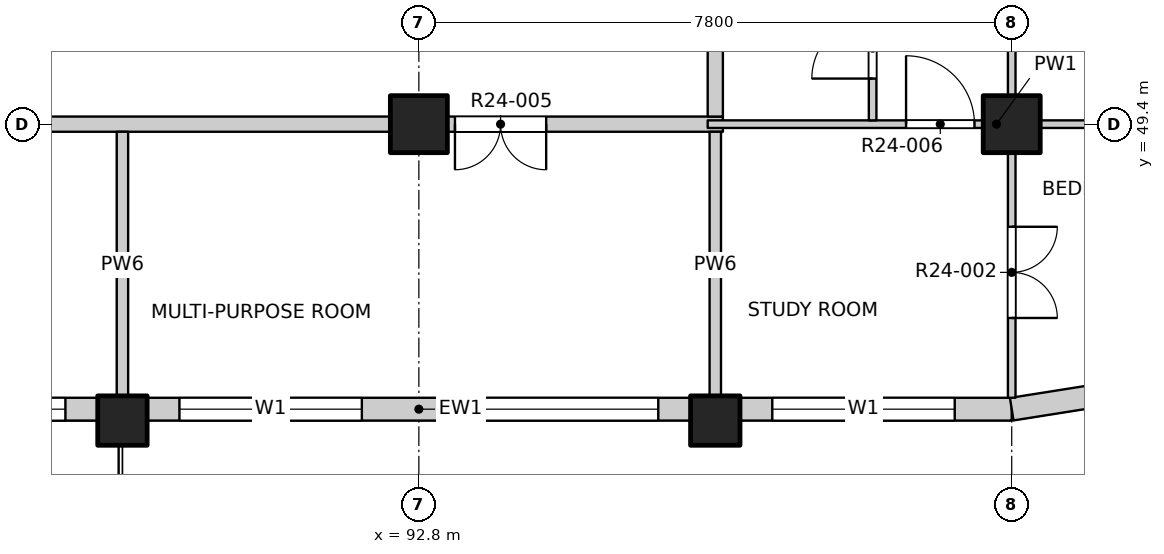
"""IFC4 building model, lengths in metres.
Left out: names, types, materials, properties, quantities, classifications, styles, units other than length and angle.
Written with IfcOpenShell. Run it as: python <this file> out.ifc"""

import sys

from ifc_helpers import new_model, si_unit, direction, frame, frame_2d, origin, origin_2d, place, context, subcontext, project, spatial, rectangle, extrude, element, fill, save


model = new_model("IFC4")
c1 = context("Model", 3, precision=1e-05, world=origin(), true_north=direction((0.0, 1.0)))
c2 = subcontext(c1, "Body", "Model", "MODEL_VIEW")
j1 = project(units=[si_unit("LENGTHUNIT", "METRE"), si_unit("PLANEANGLEUNIT", "RADIAN")], contexts=[c1])
p1 = place(None, origin())
s1 = spatial("IfcSite", under=j1, at=p1, CompositionType="ELEMENT")
p2 = place(p1, origin())
s2 = spatial("IfcBuilding", under=s1, at=p2, CompositionType="ELEMENT")
p3 = place(p2, frame((0.0, 0.0, 246.0)))
s3 = spatial("IfcBuildingStorey", under=s2, at=p3, CompositionType="ELEMENT", Elevation=246.0)
for number, where, z_axis, x_axis in (
    (1, (88.9, 45.5, -0.3), (0.0, 0.0, 1.0), (1.0, 0.0, 0.0)),
    (2, (96.7, 45.5, -0.3), (0.0, 0.0, 1.0), (1.0, 0.0, 0.0)),
):
    element("IfcColumn", number, at=place(p3, frame(where, z_axis=z_axis, x_axis=x_axis)), inside=s3, PredefinedType="COLUMN", context=c2, shape_type="SweptSolid", body=[
        extrude(rectangle(XDim=0.65, YDim=0.65, at=origin_2d()), origin(), (0.0, 0.0, 1.0), 3.45),
    ])
for number, where, z_axis, x_axis in (
    (3, (92.8, 49.4, -0.3), (0.0, 0.0, 1.0), (1.0, 0.0, 0.0)),
    (4, (100.6, 49.4, -0.3), (0.0, 0.0, 1.0), (1.0, 0.0, 0.0)),
):
    element("IfcColumn", number, at=place(p3, frame(where, z_axis=z_axis, x_axis=x_axis)), inside=s3, PredefinedType="COLUMN", context=c2, shape_type="SweptSolid", body=[
        extrude(rectangle(XDim=0.75, YDim=0.75, at=origin_2d()), origin(), (0.0, 0.0, 1.0), 3.45),
    ])
p4 = place(p3, frame((81.425, 45.65, 0.0), z_axis=(0.0, 0.0, 1.0), x_axis=(1.0, 0.0, 0.0)))
e5 = element("IfcWall", 5, at=p4, inside=s3, PredefinedType="SOLIDWALL", context=c2, shape_type="SweptSolid", body=[
    extrude(rectangle(XDim=7.15, YDim=0.3, at=frame_2d((3.575, 0.0))), origin(), (0.0, 0.0, 1.0), 2.7),
])
p5 = place(p4, frame((0.725, 0.0, 0.0)))
e6 = element("IfcOpeningElement", 6, at=p5, cuts=e5, PredefinedType="OPENING", context=c2, shape_type="SweptSolid", body=[
    extrude(rectangle(XDim=1.8, YDim=2.4, at=frame_2d((0.9, 1.2))), frame((0.0, 0.16, 0.0), z_axis=(0.0, -1.0, 0.0), x_axis=(1.0, 0.0, 0.0)), (0.0, 0.0, 1.0), 0.32),
])
p6 = place(p4, frame((4.325, 0.0, 0.9)))
e7 = element("IfcOpeningElement", 7, at=p6, cuts=e5, PredefinedType="OPENING", context=c2, shape_type="SweptSolid", body=[
    extrude(rectangle(XDim=2.4, YDim=1.8, at=frame_2d((1.2, 0.9))), frame((0.0, 0.16, 0.0), z_axis=(0.0, -1.0, 0.0), x_axis=(1.0, 0.0, 0.0)), (0.0, 0.0, 1.0), 0.32),
])
p7 = place(p3, frame((89.225, 45.65, 0.0), z_axis=(0.0, 0.0, 1.0), x_axis=(1.0, 0.0, 0.0)))
e8 = element("IfcWall", 8, at=p7, inside=s3, PredefinedType="SOLIDWALL", context=c2, shape_type="SweptSolid", body=[
    extrude(rectangle(XDim=7.15, YDim=0.3, at=frame_2d((3.575, 0.0))), origin(), (0.0, 0.0, 1.0), 2.7),
])
p8 = place(p7, frame((0.425, 0.0, 0.9)))
e9 = element("IfcOpeningElement", 9, at=p8, cuts=e8, PredefinedType="OPENING", context=c2, shape_type="SweptSolid", body=[
    extrude(rectangle(XDim=2.4, YDim=1.8, at=frame_2d((1.2, 0.9))), frame((0.0, 0.16, 0.0), z_axis=(0.0, -1.0, 0.0), x_axis=(1.0, 0.0, 0.0)), (0.0, 0.0, 1.0), 0.32),
])
p9 = place(p7, frame((4.325, 0.0, 0.9)))
e10 = element("IfcOpeningElement", 10, at=p9, cuts=e8, PredefinedType="OPENING", context=c2, shape_type="SweptSolid", body=[
    extrude(rectangle(XDim=2.4, YDim=1.8, at=frame_2d((1.2, 0.9))), frame((0.0, 0.16, 0.0), z_axis=(0.0, -1.0, 0.0), x_axis=(1.0, 0.0, 0.0)), (0.0, 0.0, 1.0), 0.32),
])
p10 = place(p3, frame((97.025, 45.65, 0.0), z_axis=(0.0, 0.0, 1.0), x_axis=(1.0, 0.0, 0.0)))
e11 = element("IfcWall", 11, at=p10, inside=s3, PredefinedType="SOLIDWALL", context=c2, shape_type="SweptSolid", body=[
    extrude(rectangle(XDim=3.575, YDim=0.3, at=frame_2d((1.788, 0.0))), origin(), (0.0, 0.0, 1.0), 2.7),
])
p11 = place(p10, frame((0.425, 0.0, 0.9)))
e12 = element("IfcOpeningElement", 12, at=p11, cuts=e11, PredefinedType="OPENING", context=c2, shape_type="SweptSolid", body=[
    extrude(rectangle(XDim=2.4, YDim=1.8, at=frame_2d((1.2, 0.9))), frame((0.0, 0.16, 0.0), z_axis=(0.0, -1.0, 0.0), x_axis=(1.0, 0.0, 0.0)), (0.0, 0.0, 1.0), 0.32),
])
p12 = place(p3, frame((100.6, 45.65, 0.0), z_axis=(0.0, 0.0, 1.0), x_axis=(0.987678452879, 0.156496880861, 0.0)))
e13 = element("IfcWall", 13, at=p12, inside=s3, PredefinedType="SOLIDWALL", context=c2, shape_type="SweptSolid", body=[
    extrude(rectangle(XDim=1.173, YDim=0.3, at=frame_2d((0.586, 0.0))), origin(), (0.0, 0.0, 1.0), 2.7),
])
p13 = place(p3, frame((73.2, 49.4, 0.0), z_axis=(0.0, 0.0, 1.0), x_axis=(1.0, 0.0, 0.0)))
e14 = element("IfcWall", 14, at=p13, inside=s3, PredefinedType="PARTITIONING", context=c2, shape_type="SweptSolid", body=[
    extrude(rectangle(XDim=23.6, YDim=0.2, at=frame_2d((11.8, 0.0))), origin(), (0.0, 0.0, 1.0), 3.15),
])
p14 = place(p13, frame((7.3, 0.0, 0.0)))
e15 = element("IfcOpeningElement", 15, at=p14, cuts=e14, PredefinedType="OPENING", context=c2, shape_type="SweptSolid", body=[
    extrude(rectangle(XDim=1.2, YDim=2.1, at=frame_2d((0.6, 1.05))), frame((0.0, 0.11, 0.0), z_axis=(0.0, -1.0, 0.0), x_axis=(1.0, 0.0, 0.0)), (0.0, 0.0, 1.0), 0.22),
])
p15 = place(p13, frame((20.075, 0.0, 0.0)))
e16 = element("IfcOpeningElement", 16, at=p15, cuts=e14, PredefinedType="OPENING", context=c2, shape_type="SweptSolid", body=[
    extrude(rectangle(XDim=1.2, YDim=2.1, at=frame_2d((0.6, 1.05))), frame((0.0, 0.11, 0.0), z_axis=(0.0, -1.0, 0.0), x_axis=(1.0, 0.0, 0.0)), (0.0, 0.0, 1.0), 0.22),
])
p16 = place(p3, frame((96.6, 49.4, 0.0), z_axis=(0.0, 0.0, 1.0), x_axis=(1.0, 0.0, 0.0)))
e17 = element("IfcWall", 17, at=p16, inside=s3, PredefinedType="PARTITIONING", context=c2, shape_type="SweptSolid", body=[
    extrude(rectangle(XDim=7.6, YDim=0.1, at=frame_2d((3.8, 0.0))), origin(), (0.0, 0.0, 1.0), 3.15),
])
p17 = place(p16, frame((2.61, 0.0, 0.0)))
e18 = element("IfcOpeningElement", 18, at=p17, cuts=e17, PredefinedType="OPENING", context=c2, shape_type="SweptSolid", body=[
    extrude(rectangle(XDim=0.9, YDim=2.1, at=frame_2d((0.45, 1.05))), frame((0.0, 0.06, 0.0), z_axis=(0.0, -1.0, 0.0), x_axis=(1.0, 0.0, 0.0)), (0.0, 0.0, 1.0), 0.12),
])
p18 = place(p3, frame((88.9, 45.8, 0.0), z_axis=(0.0, 0.0, 1.0), x_axis=(0.0, 1.0, 0.0)))
e19 = element("IfcWall", 19, at=p18, inside=s3, PredefinedType="PARTITIONING", context=c2, shape_type="SweptSolid", body=[
    extrude(rectangle(XDim=3.5, YDim=0.15, at=frame_2d((1.75, 0.0))), origin(), (0.0, 0.0, 1.0), 2.55),
])
p19 = place(p3, frame((96.7, 45.8, 0.0), z_axis=(0.0, 0.0, 1.0), x_axis=(0.0, 1.0, 0.0)))
e20 = element("IfcWall", 20, at=p19, inside=s3, PredefinedType="PARTITIONING", context=c2, shape_type="SweptSolid", body=[
    extrude(rectangle(XDim=3.5, YDim=0.15, at=frame_2d((1.75, 0.0))), origin(), (0.0, 0.0, 1.0), 3.15),
])
p20 = place(p3, frame((96.7, 49.5, 0.0), z_axis=(0.0, 0.0, 1.0), x_axis=(0.0, 1.0, 0.0)))
e21 = element("IfcWall", 21, at=p20, inside=s3, PredefinedType="PARTITIONING", context=c2, shape_type="SweptSolid", body=[
    extrude(rectangle(XDim=34.7, YDim=0.2, at=frame_2d((17.35, 0.0))), origin(), (0.0, 0.0, 1.0), 3.15),
])
p21 = place(p20, frame((3.075, 0.0, 0.0)))
e22 = element("IfcOpeningElement", 22, at=p21, cuts=e21, PredefinedType="OPENING", context=c2, shape_type="SweptSolid", body=[
    extrude(rectangle(XDim=1.0, YDim=2.1, at=frame_2d((0.5, 1.05))), frame((0.0, 0.11, 0.0), z_axis=(0.0, -1.0, 0.0), x_axis=(1.0, 0.0, 0.0)), (0.0, 0.0, 1.0), 0.22),
])
p22 = place(p20, frame((18.425, 0.0, 0.0)))
e23 = element("IfcOpeningElement", 23, at=p22, cuts=e21, PredefinedType="OPENING", context=c2, shape_type="SweptSolid", body=[
    extrude(rectangle(XDim=1.0, YDim=2.1, at=frame_2d((0.5, 1.05))), frame((0.0, 0.11, 0.0), z_axis=(0.0, -1.0, 0.0), x_axis=(1.0, 0.0, 0.0)), (0.0, 0.0, 1.0), 0.22),
])
p23 = place(p20, frame((25.825, 0.0, 0.0)))
e24 = element("IfcOpeningElement", 24, at=p23, cuts=e21, PredefinedType="OPENING", context=c2, shape_type="SweptSolid", body=[
    extrude(rectangle(XDim=1.0, YDim=2.1, at=frame_2d((0.5, 1.05))), frame((0.0, 0.11, 0.0), z_axis=(0.0, -1.0, 0.0), x_axis=(1.0, 0.0, 0.0)), (0.0, 0.0, 1.0), 0.22),
])
p24 = place(p3, frame((98.77, 49.45, 0.0), z_axis=(0.0, 0.0, 1.0), x_axis=(0.0, 1.0, 0.0)))
e25 = element("IfcWall", 25, at=p24, inside=s3, PredefinedType="PARTITIONING", context=c2, shape_type="SweptSolid", body=[
    extrude(rectangle(XDim=4.25, YDim=0.1, at=frame_2d((2.125, 0.0))), origin(), (0.0, 0.0, 1.0), 3.15),
])
p25 = place(p24, frame((0.55, 0.0, 0.0)))
e26 = element("IfcOpeningElement", 26, at=p25, cuts=e25, PredefinedType="OPENING", context=c2, shape_type="SweptSolid", body=[
    extrude(rectangle(XDim=0.8, YDim=2.1, at=frame_2d((0.4, 1.05))), frame((0.0, 0.06, 0.0), z_axis=(0.0, -1.0, 0.0), x_axis=(1.0, 0.0, 0.0)), (0.0, 0.0, 1.0), 0.12),
])
p26 = place(p24, frame((2.675, 0.0, 0.0)))
e27 = element("IfcOpeningElement", 27, at=p26, cuts=e25, PredefinedType="OPENING", context=c2, shape_type="SweptSolid", body=[
    extrude(rectangle(XDim=0.9, YDim=2.1, at=frame_2d((0.45, 1.05))), frame((0.0, 0.06, 0.0), z_axis=(0.0, -1.0, 0.0), x_axis=(1.0, 0.0, 0.0)), (0.0, 0.0, 1.0), 0.12),
])
p27 = place(p3, frame((100.6, 45.8, 0.0), z_axis=(0.0, 0.0, 1.0), x_axis=(0.0, 1.0, 0.0)))
e28 = element("IfcWall", 28, at=p27, inside=s3, PredefinedType="PARTITIONING", context=c2, shape_type="SweptSolid", body=[
    extrude(rectangle(XDim=38.4, YDim=0.1, at=frame_2d((19.2, 0.0))), origin(), (0.0, 0.0, 1.0), 3.15),
])
p28 = place(p27, frame((1.05, 0.0, 0.0)))
e29 = element("IfcOpeningElement", 29, at=p28, cuts=e28, PredefinedType="OPENING", context=c2, shape_type="SweptSolid", body=[
    extrude(rectangle(XDim=1.2, YDim=2.1, at=frame_2d((0.6, 1.05))), frame((0.0, 0.06, 0.0), z_axis=(0.0, -1.0, 0.0), x_axis=(1.0, 0.0, 0.0)), (0.0, 0.0, 1.0), 0.12),
])
p29 = place(p27, frame((6.9, 0.0, 0.0)))
e30 = element("IfcOpeningElement", 30, at=p29, cuts=e28, PredefinedType="OPENING", context=c2, shape_type="SweptSolid", body=[
    extrude(rectangle(XDim=1.2, YDim=2.1, at=frame_2d((0.6, 1.05))), frame((0.0, 0.06, 0.0), z_axis=(0.0, -1.0, 0.0), x_axis=(1.0, 0.0, 0.0)), (0.0, 0.0, 1.0), 0.12),
])
p30 = place(p27, frame((12.9, 0.0, 0.0)))
e31 = element("IfcOpeningElement", 31, at=p30, cuts=e28, PredefinedType="OPENING", context=c2, shape_type="SweptSolid", body=[
    extrude(rectangle(XDim=0.9, YDim=2.1, at=frame_2d((0.45, 1.05))), frame((0.0, 0.06, 0.0), z_axis=(0.0, -1.0, 0.0), x_axis=(1.0, 0.0, 0.0)), (0.0, 0.0, 1.0), 0.12),
])
p31 = place(p27, frame((16.8, 0.0, 0.0)))
e32 = element("IfcOpeningElement", 32, at=p31, cuts=e28, PredefinedType="OPENING", context=c2, shape_type="SweptSolid", body=[
    extrude(rectangle(XDim=0.9, YDim=2.1, at=frame_2d((0.45, 1.05))), frame((0.0, 0.06, 0.0), z_axis=(0.0, -1.0, 0.0), x_axis=(1.0, 0.0, 0.0)), (0.0, 0.0, 1.0), 0.12),
])
p32 = place(p27, frame((20.7, 0.0, 0.0)))
e33 = element("IfcOpeningElement", 33, at=p32, cuts=e28, PredefinedType="OPENING", context=c2, shape_type="SweptSolid", body=[
    extrude(rectangle(XDim=0.9, YDim=2.1, at=frame_2d((0.45, 1.05))), frame((0.0, 0.06, 0.0), z_axis=(0.0, -1.0, 0.0), x_axis=(1.0, 0.0, 0.0)), (0.0, 0.0, 1.0), 0.12),
])
p33 = place(p27, frame((24.6, 0.0, 0.0)))
e34 = element("IfcOpeningElement", 34, at=p33, cuts=e28, PredefinedType="OPENING", context=c2, shape_type="SweptSolid", body=[
    extrude(rectangle(XDim=0.9, YDim=2.1, at=frame_2d((0.45, 1.05))), frame((0.0, 0.06, 0.0), z_axis=(0.0, -1.0, 0.0), x_axis=(1.0, 0.0, 0.0)), (0.0, 0.0, 1.0), 0.12),
])
p34 = place(p27, frame((30.3, 0.0, 0.0)))
e35 = element("IfcOpeningElement", 35, at=p34, cuts=e28, PredefinedType="OPENING", context=c2, shape_type="SweptSolid", body=[
    extrude(rectangle(XDim=1.2, YDim=2.1, at=frame_2d((0.6, 1.05))), frame((0.0, 0.06, 0.0), z_axis=(0.0, -1.0, 0.0), x_axis=(1.0, 0.0, 0.0)), (0.0, 0.0, 1.0), 0.12),
])
p35 = place(p27, frame((36.15, 0.0, 0.0)))
e36 = element("IfcOpeningElement", 36, at=p35, cuts=e28, PredefinedType="OPENING", context=c2, shape_type="SweptSolid", body=[
    extrude(rectangle(XDim=1.2, YDim=2.1, at=frame_2d((0.6, 1.05))), frame((0.0, 0.06, 0.0), z_axis=(0.0, -1.0, 0.0), x_axis=(1.0, 0.0, 0.0)), (0.0, 0.0, 1.0), 0.12),
])
p36 = place(p6, origin())
e37 = element("IfcWindow", 37, at=p36, inside=s3, PartitioningType="DOUBLE_PANEL_VERTICAL", PredefinedType="WINDOW", context=c2, shape_type="SweptSolid", body=[
    extrude(rectangle(XDim=2.4, YDim=1.8, at=frame_2d((1.2, 0.9))), frame((0.0, 0.03, 0.0), z_axis=(0.0, -1.0, 0.0), x_axis=(1.0, 0.0, 0.0)), (0.0, 0.0, 1.0), 0.06),
])
fill(e7, e37)
p37 = place(p8, origin())
e38 = element("IfcWindow", 38, at=p37, inside=s3, PartitioningType="DOUBLE_PANEL_VERTICAL", PredefinedType="WINDOW", context=c2, shape_type="SweptSolid", body=[
    extrude(rectangle(XDim=2.4, YDim=1.8, at=frame_2d((1.2, 0.9))), frame((0.0, 0.03, 0.0), z_axis=(0.0, -1.0, 0.0), x_axis=(1.0, 0.0, 0.0)), (0.0, 0.0, 1.0), 0.06),
])
fill(e9, e38)
p38 = place(p9, origin())
e39 = element("IfcWindow", 39, at=p38, inside=s3, PartitioningType="DOUBLE_PANEL_VERTICAL", PredefinedType="WINDOW", context=c2, shape_type="SweptSolid", body=[
    extrude(rectangle(XDim=2.4, YDim=1.8, at=frame_2d((1.2, 0.9))), frame((0.0, 0.03, 0.0), z_axis=(0.0, -1.0, 0.0), x_axis=(1.0, 0.0, 0.0)), (0.0, 0.0, 1.0), 0.06),
])
fill(e10, e39)
p39 = place(p11, origin())
e40 = element("IfcWindow", 40, at=p39, inside=s3, PartitioningType="DOUBLE_PANEL_VERTICAL", PredefinedType="WINDOW", context=c2, shape_type="SweptSolid", body=[
    extrude(rectangle(XDim=2.4, YDim=1.8, at=frame_2d((1.2, 0.9))), frame((0.0, 0.03, 0.0), z_axis=(0.0, -1.0, 0.0), x_axis=(1.0, 0.0, 0.0)), (0.0, 0.0, 1.0), 0.06),
])
fill(e12, e40)
p40 = place(p28, origin())
e41 = element("IfcDoor", 41, at=p40, inside=s3, OperationType="DOUBLE_DOOR_SINGLE_SWING", PredefinedType="DOOR", context=c2, shape_type="SweptSolid", body=[
    extrude(rectangle(XDim=1.2, YDim=2.1, at=frame_2d((0.6, 1.05))), frame((0.0, 0.025, 0.0), z_axis=(0.0, -1.0, 0.0), x_axis=(1.0, 0.0, 0.0)), (0.0, 0.0, 1.0), 0.05),
])
fill(e29, e41)
p41 = place(p15, origin())
e42 = element("IfcDoor", 42, at=p41, inside=s3, OperationType="DOUBLE_DOOR_SINGLE_SWING", PredefinedType="DOOR", context=c2, shape_type="SweptSolid", body=[
    extrude(rectangle(XDim=1.2, YDim=2.1, at=frame_2d((0.6, 1.05))), frame((0.0, 0.025, 0.0), z_axis=(0.0, -1.0, 0.0), x_axis=(1.0, 0.0, 0.0)), (0.0, 0.0, 1.0), 0.05),
])
fill(e16, e42)
p42 = place(p17, origin())
e43 = element("IfcDoor", 43, at=p42, inside=s3, OperationType="SINGLE_SWING_LEFT", PredefinedType="DOOR", context=c2, shape_type="SweptSolid", body=[
    extrude(rectangle(XDim=0.9, YDim=2.1, at=frame_2d((0.45, 1.05))), frame((0.0, 0.025, 0.0), z_axis=(0.0, -1.0, 0.0), x_axis=(1.0, 0.0, 0.0)), (0.0, 0.0, 1.0), 0.05),
])
fill(e18, e43)
p43 = place(p25, origin())
e44 = element("IfcDoor", 44, at=p43, inside=s3, OperationType="SINGLE_SWING_LEFT", PredefinedType="DOOR", context=c2, shape_type="SweptSolid", body=[
    extrude(rectangle(XDim=0.8, YDim=2.1, at=frame_2d((0.4, 1.05))), frame((0.0, 0.025, 0.0), z_axis=(0.0, -1.0, 0.0), x_axis=(1.0, 0.0, 0.0)), (0.0, 0.0, 1.0), 0.05),
])
fill(e26, e44)
save(model, sys.argv[1])
